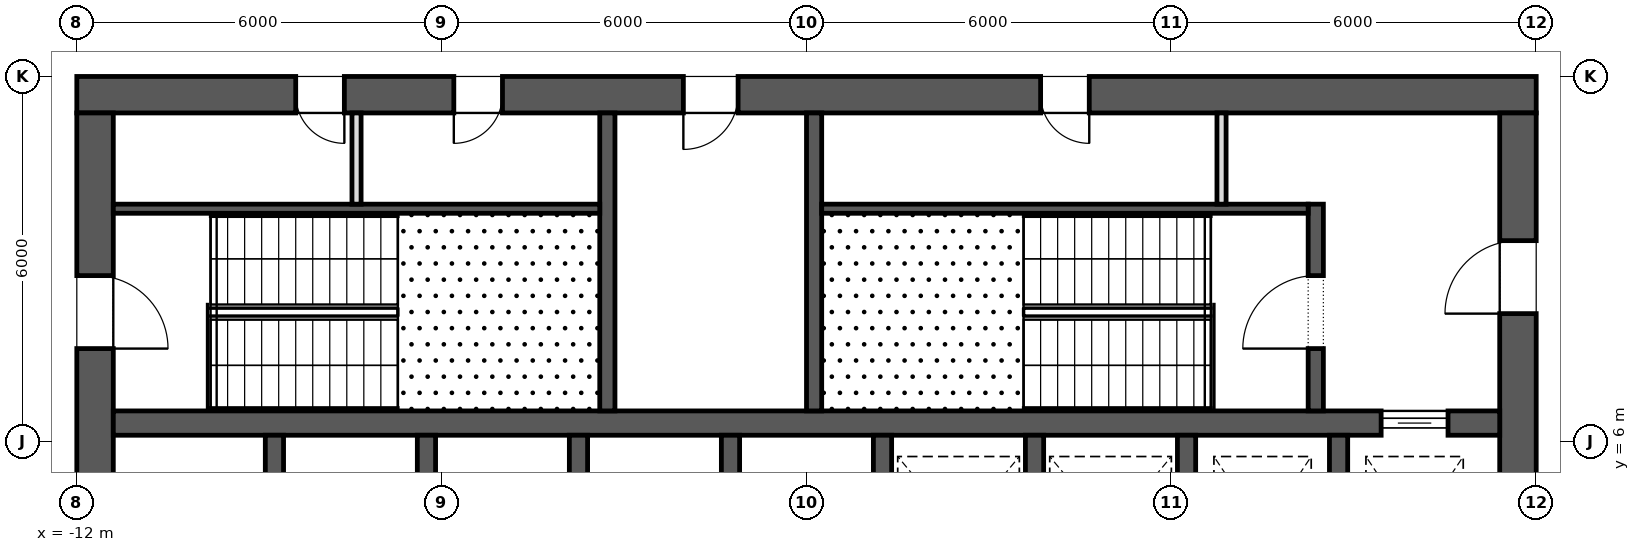
"""IFC4 building model, lengths in metres.
Left out: names, types, materials, properties, quantities, classifications, styles, units other than length and angle.
Written with IfcOpenShell. Run it as: python <this file> out.ifc"""

import sys

from ifc_helpers import new_model, si_unit, direction, frame, frame_2d, origin, place, context, subcontext, project, spatial, rectangle, extrude, element, fill, save


model = new_model("IFC4")
c1 = context("Model", 3, precision=1e-05, world=origin(), true_north=direction((0.0, 1.0)))
c2 = subcontext(c1, "Body", "Model", "MODEL_VIEW")
j1 = project(units=[si_unit("LENGTHUNIT", "METRE"), si_unit("PLANEANGLEUNIT", "RADIAN")], contexts=[c1])
p1 = place(None, origin())
s1 = spatial("IfcSite", under=j1, at=p1, CompositionType="ELEMENT")
p2 = place(p1, origin())
s2 = spatial("IfcBuilding", under=s1, at=p2, CompositionType="ELEMENT")
p3 = place(p2, frame((0.0, 0.0, 57.1)))
s3 = spatial("IfcBuildingStorey", under=s2, at=p3, CompositionType="ELEMENT", Elevation=57.1)
p4 = place(p3, frame((-12.0, 11.7, 0.0), z_axis=(0.0, 0.0, 1.0), x_axis=(1.0, 0.0, 0.0)))
e1 = element("IfcWall", 1, at=p4, inside=s3, PredefinedType="SHEAR", context=c2, shape_type="SweptSolid", body=[
    extrude(rectangle(XDim=24.0, YDim=0.6, at=frame_2d((12.0, 0.0))), origin(), (0.0, 0.0, 1.0), 4.2),
])
p5 = place(p4, frame((9.975, 0.0, 0.0)))
e2 = element("IfcOpeningElement", 2, at=p5, cuts=e1, PredefinedType="OPENING", context=c2, shape_type="SweptSolid", body=[
    extrude(rectangle(XDim=0.9, YDim=2.1, at=frame_2d((0.45, 1.05))), frame((0.0, 0.312, 0.0), z_axis=(0.0, -1.0, 0.0), x_axis=(1.0, 0.0, 0.0)), (0.0, 0.0, 1.0), 0.624),
])
p6 = place(p4, frame((3.6, 0.0, 0.0)))
e3 = element("IfcOpeningElement", 3, at=p6, cuts=e1, PredefinedType="OPENING", context=c2, shape_type="SweptSolid", body=[
    extrude(rectangle(XDim=0.8, YDim=2.1, at=frame_2d((0.4, 1.05))), frame((0.0, 0.312, 0.0), z_axis=(0.0, -1.0, 0.0), x_axis=(1.0, 0.0, 0.0)), (0.0, 0.0, 1.0), 0.624),
])
p7 = place(p4, frame((6.2, 0.0, 0.0)))
e4 = element("IfcOpeningElement", 4, at=p7, cuts=e1, PredefinedType="OPENING", context=c2, shape_type="SweptSolid", body=[
    extrude(rectangle(XDim=0.8, YDim=2.1, at=frame_2d((0.4, 1.05))), frame((0.0, 0.312, 0.0), z_axis=(0.0, -1.0, 0.0), x_axis=(1.0, 0.0, 0.0)), (0.0, 0.0, 1.0), 0.624),
])
p8 = place(p4, frame((15.85, 0.0, 0.0)))
e5 = element("IfcOpeningElement", 5, at=p8, cuts=e1, PredefinedType="OPENING", context=c2, shape_type="SweptSolid", body=[
    extrude(rectangle(XDim=0.8, YDim=2.1, at=frame_2d((0.4, 1.05))), frame((0.0, 0.312, 0.0), z_axis=(0.0, -1.0, 0.0), x_axis=(1.0, 0.0, 0.0)), (0.0, 0.0, 1.0), 0.624),
])
p9 = place(p3, frame((11.7, -11.4, 0.0), z_axis=(0.0, 0.0, 1.0), x_axis=(0.0, 1.0, 0.0)))
e6 = element("IfcWall", 6, at=p9, inside=s3, PredefinedType="SHEAR", context=c2, shape_type="SweptSolid", body=[
    extrude(rectangle(XDim=22.8, YDim=0.6, at=frame_2d((11.4, 0.0))), origin(), (0.0, 0.0, 1.0), 4.2),
])
p10 = place(p9, frame((10.2, 0.0, 0.0)))
e7 = element("IfcOpeningElement", 7, at=p10, cuts=e6, PredefinedType="OPENING", context=c2, shape_type="SweptSolid", body=[
    extrude(rectangle(XDim=2.4, YDim=2.1, at=frame_2d((1.2, 1.05))), frame((0.0, 0.312, 0.0), z_axis=(0.0, -1.0, 0.0), x_axis=(1.0, 0.0, 0.0)), (0.0, 0.0, 1.0), 0.624),
])
p11 = place(p9, frame((19.5, 0.0, 0.0)))
e8 = element("IfcOpeningElement", 8, at=p11, cuts=e6, PredefinedType="OPENING", context=c2, shape_type="SweptSolid", body=[
    extrude(rectangle(XDim=1.2, YDim=2.1, at=frame_2d((0.6, 1.05))), frame((0.0, 0.312, 0.0), z_axis=(0.0, -1.0, 0.0), x_axis=(1.0, 0.0, 0.0)), (0.0, 0.0, 1.0), 0.624),
])
p12 = place(p9, frame((2.1, 0.0, 0.0)))
e9 = element("IfcOpeningElement", 9, at=p12, cuts=e6, PredefinedType="OPENING", context=c2, shape_type="SweptSolid", body=[
    extrude(rectangle(XDim=1.2, YDim=2.1, at=frame_2d((0.6, 1.05))), frame((0.0, 0.312, 0.0), z_axis=(0.0, -1.0, 0.0), x_axis=(1.0, 0.0, 0.0)), (0.0, 0.0, 1.0), 0.624),
])
p13 = place(p3, frame((-11.7, -11.4, 0.0), z_axis=(0.0, 0.0, 1.0), x_axis=(0.0, 1.0, 0.0)))
e10 = element("IfcWall", 10, at=p13, inside=s3, PredefinedType="SHEAR", context=c2, shape_type="SweptSolid", body=[
    extrude(rectangle(XDim=22.8, YDim=0.6, at=frame_2d((11.4, 0.0))), origin(), (0.0, 0.0, 1.0), 4.2),
])
p14 = place(p13, frame((10.2, 0.0, 0.0)))
e11 = element("IfcOpeningElement", 11, at=p14, cuts=e10, PredefinedType="OPENING", context=c2, shape_type="SweptSolid", body=[
    extrude(rectangle(XDim=2.4, YDim=2.1, at=frame_2d((1.2, 1.05))), frame((0.0, 0.312, 0.0), z_axis=(0.0, -1.0, 0.0), x_axis=(1.0, 0.0, 0.0)), (0.0, 0.0, 1.0), 0.624),
])
p15 = place(p13, frame((18.925, 0.0, 0.0)))
e12 = element("IfcOpeningElement", 12, at=p15, cuts=e10, PredefinedType="OPENING", context=c2, shape_type="SweptSolid", body=[
    extrude(rectangle(XDim=1.2, YDim=2.1, at=frame_2d((0.6, 1.05))), frame((0.0, 0.312, 0.0), z_axis=(0.0, -1.0, 0.0), x_axis=(1.0, 0.0, 0.0)), (0.0, 0.0, 1.0), 0.624),
])
p16 = place(p13, frame((2.675, 0.0, 0.0)))
e13 = element("IfcOpeningElement", 13, at=p16, cuts=e10, PredefinedType="OPENING", context=c2, shape_type="SweptSolid", body=[
    extrude(rectangle(XDim=1.2, YDim=2.1, at=frame_2d((0.6, 1.05))), frame((0.0, 0.312, 0.0), z_axis=(0.0, -1.0, 0.0), x_axis=(1.0, 0.0, 0.0)), (0.0, 0.0, 1.0), 0.624),
])
p17 = place(p3, frame((-11.4, 6.3, 0.0), z_axis=(0.0, 0.0, 1.0), x_axis=(1.0, 0.0, 0.0)))
e14 = element("IfcWall", 14, at=p17, inside=s3, PredefinedType="SHEAR", context=c2, shape_type="SweptSolid", body=[
    extrude(rectangle(XDim=22.8, YDim=0.4, at=frame_2d((11.4, 0.0))), origin(), (0.0, 0.0, 1.0), 4.2),
])
p18 = place(p17, frame((20.85, 0.0, 0.0)))
e15 = element("IfcOpeningElement", 15, at=p18, cuts=e14, PredefinedType="OPENING", context=c2, shape_type="SweptSolid", body=[
    extrude(rectangle(XDim=1.1, YDim=2.1, at=frame_2d((0.55, 1.05))), frame((0.0, 0.212, 0.0), z_axis=(0.0, -1.0, 0.0), x_axis=(1.0, 0.0, 0.0)), (0.0, 0.0, 1.0), 0.424),
])
for number, where, z_axis, x_axis in (
    (16, (-8.75, 3.2, 0.0), (0.0, 0.0, 1.0), (0.0, 1.0, 0.0)),
    (17, (-6.25, 3.2, 0.0), (0.0, 0.0, 1.0), (0.0, 1.0, 0.0)),
    (18, (-3.75, 3.2, 0.0), (0.0, 0.0, 1.0), (0.0, 1.0, 0.0)),
    (19, (-1.25, 3.2, 0.0), (0.0, 0.0, 1.0), (0.0, 1.0, 0.0)),
    (20, (1.25, 3.2, 0.0), (0.0, 0.0, 1.0), (0.0, 1.0, 0.0)),
    (21, (3.75, 3.2, 0.0), (0.0, 0.0, 1.0), (0.0, 1.0, 0.0)),
    (22, (6.25, 3.2, 0.0), (0.0, 0.0, 1.0), (0.0, 1.0, 0.0)),
    (23, (8.75, 3.2, 0.0), (0.0, 0.0, 1.0), (0.0, 1.0, 0.0)),
):
    element("IfcWall", number, at=place(p3, frame(where, z_axis=z_axis, x_axis=x_axis)), inside=s3, PredefinedType="SHEAR", context=c2, shape_type="SweptSolid", body=[
        extrude(rectangle(XDim=2.9, YDim=0.3, at=frame_2d((1.45, 0.0))), origin(), (0.0, 0.0, 1.0), 4.2),
    ])
for number, where, z_axis, x_axis in (
    (24, (-3.275, 6.5, 0.0), (0.0, 0.0, 1.0), (0.0, 1.0, 0.0)),
    (25, (0.125, 6.5, 0.0), (0.0, 0.0, 1.0), (0.0, 1.0, 0.0)),
):
    element("IfcWall", number, at=place(p3, frame(where, z_axis=z_axis, x_axis=x_axis)), inside=s3, PredefinedType="SHEAR", context=c2, shape_type="SweptSolid", body=[
        extrude(rectangle(XDim=4.9, YDim=0.25, at=frame_2d((2.45, 0.0))), origin(), (0.0, 0.0, 1.0), 3.9),
    ])
p19 = place(p3, frame((8.375, 6.5, 0.0), z_axis=(0.0, 0.0, 1.0), x_axis=(0.0, 1.0, 0.0)))
e26 = element("IfcWall", 26, at=p19, inside=s3, PredefinedType="SHEAR", context=c2, shape_type="SweptSolid", body=[
    extrude(rectangle(XDim=3.4, YDim=0.25, at=frame_2d((1.7, 0.0))), origin(), (0.0, 0.0, 1.0), 3.9),
])
p20 = place(p19, frame((1.025, 0.0, 0.0)))
e27 = element("IfcOpeningElement", 27, at=p20, cuts=e26, PredefinedType="OPENING", context=c2, shape_type="SweptSolid", body=[
    extrude(rectangle(XDim=1.2, YDim=2.1, at=frame_2d((0.6, 1.05))), frame((0.0, 0.137, 0.0), z_axis=(0.0, -1.0, 0.0), x_axis=(1.0, 0.0, 0.0)), (0.0, 0.0, 1.0), 0.274),
])
for number, where, z_axis, x_axis in (
    (28, (-11.4, 9.825, 0.0), (0.0, 0.0, 1.0), (1.0, 0.0, 0.0)),
    (29, (0.25, 9.825, 0.0), (0.0, 0.0, 1.0), (1.0, 0.0, 0.0)),
):
    element("IfcWall", number, at=place(p3, frame(where, z_axis=z_axis, x_axis=x_axis)), inside=s3, PredefinedType="SHEAR", context=c2, shape_type="SweptSolid", body=[
        extrude(rectangle(XDim=8.0, YDim=0.15, at=frame_2d((4.0, 0.0))), origin(), (0.0, 0.0, 1.0), 3.9),
    ])
for number, where, z_axis, x_axis in (
    (30, (-7.4, 9.9, 0.0), (0.0, 0.0, 1.0), (0.0, 1.0, 0.0)),
    (31, (6.825, 9.9, 0.0), (0.0, 0.0, 1.0), (0.0, 1.0, 0.0)),
):
    element("IfcWall", number, at=place(p3, frame(where, z_axis=z_axis, x_axis=x_axis)), inside=s3, PredefinedType="PARTITIONING", context=c2, shape_type="SweptSolid", body=[
        extrude(rectangle(XDim=1.5, YDim=0.15, at=frame_2d((0.75, 0.0))), origin(), (0.0, 0.0, 1.0), 3.9),
    ])
p21 = place(p18, origin())
e32 = element("IfcDoor", 32, at=p21, inside=s3, OperationType="SLIDING_TO_LEFT", PredefinedType="DOOR", context=c2, shape_type="SweptSolid", body=[
    extrude(rectangle(XDim=1.1, YDim=2.1, at=frame_2d((0.55, 1.05))), frame((0.0, 0.025, 0.0), z_axis=(0.0, -1.0, 0.0), x_axis=(1.0, 0.0, 0.0)), (0.0, 0.0, 1.0), 0.05),
])
fill(e15, e32)
p22 = place(p15, frame((1.2, 0.0, 0.0), z_axis=(0.0, 0.0, 1.0), x_axis=(-1.0, 0.0, 0.0)))
e33 = element("IfcDoor", 33, at=p22, inside=s3, OperationType="SINGLE_SWING_LEFT", PredefinedType="DOOR", context=c2, shape_type="SweptSolid", body=[
    extrude(rectangle(XDim=1.2, YDim=2.1, at=frame_2d((0.6, 1.05))), frame((0.0, 0.025, 0.0), z_axis=(0.0, -1.0, 0.0), x_axis=(1.0, 0.0, 0.0)), (0.0, 0.0, 1.0), 0.05),
])
fill(e12, e33)
p23 = place(p20, origin())
e34 = element("IfcDoor", 34, at=p23, inside=s3, OperationType="SINGLE_SWING_RIGHT", PredefinedType="DOOR", context=c2, shape_type="SweptSolid", body=[
    extrude(rectangle(XDim=1.2, YDim=2.1, at=frame_2d((0.6, 1.05))), frame((0.0, 0.025, 0.0), z_axis=(0.0, -1.0, 0.0), x_axis=(1.0, 0.0, 0.0)), (0.0, 0.0, 1.0), 0.05),
])
fill(e27, e34)
p24 = place(p11, origin())
e35 = element("IfcDoor", 35, at=p24, inside=s3, OperationType="SINGLE_SWING_RIGHT", PredefinedType="DOOR", context=c2, shape_type="SweptSolid", body=[
    extrude(rectangle(XDim=1.2, YDim=2.1, at=frame_2d((0.6, 1.05))), frame((0.0, 0.025, 0.0), z_axis=(0.0, -1.0, 0.0), x_axis=(1.0, 0.0, 0.0)), (0.0, 0.0, 1.0), 0.05),
])
fill(e8, e35)
p25 = place(p5, frame((0.9, 0.0, 0.0), z_axis=(0.0, 0.0, 1.0), x_axis=(-1.0, 0.0, 0.0)))
e36 = element("IfcDoor", 36, at=p25, inside=s3, OperationType="SINGLE_SWING_LEFT", PredefinedType="DOOR", context=c2, shape_type="SweptSolid", body=[
    extrude(rectangle(XDim=0.9, YDim=2.1, at=frame_2d((0.45, 1.05))), frame((0.0, 0.025, 0.0), z_axis=(0.0, -1.0, 0.0), x_axis=(1.0, 0.0, 0.0)), (0.0, 0.0, 1.0), 0.05),
])
fill(e2, e36)
p26 = place(p6, frame((0.8, 0.0, 0.0), z_axis=(0.0, 0.0, 1.0), x_axis=(-1.0, 0.0, 0.0)))
e37 = element("IfcDoor", 37, at=p26, inside=s3, OperationType="SINGLE_SWING_RIGHT", PredefinedType="DOOR", context=c2, shape_type="SweptSolid", body=[
    extrude(rectangle(XDim=0.8, YDim=2.1, at=frame_2d((0.4, 1.05))), frame((0.0, 0.025, 0.0), z_axis=(0.0, -1.0, 0.0), x_axis=(1.0, 0.0, 0.0)), (0.0, 0.0, 1.0), 0.05),
])
fill(e3, e37)
p27 = place(p7, frame((0.8, 0.0, 0.0), z_axis=(0.0, 0.0, 1.0), x_axis=(-1.0, 0.0, 0.0)))
e38 = element("IfcDoor", 38, at=p27, inside=s3, OperationType="SINGLE_SWING_LEFT", PredefinedType="DOOR", context=c2, shape_type="SweptSolid", body=[
    extrude(rectangle(XDim=0.8, YDim=2.1, at=frame_2d((0.4, 1.05))), frame((0.0, 0.025, 0.0), z_axis=(0.0, -1.0, 0.0), x_axis=(1.0, 0.0, 0.0)), (0.0, 0.0, 1.0), 0.05),
])
fill(e4, e38)
p28 = place(p8, frame((0.8, 0.0, 0.0), z_axis=(0.0, 0.0, 1.0), x_axis=(-1.0, 0.0, 0.0)))
e39 = element("IfcDoor", 39, at=p28, inside=s3, OperationType="SINGLE_SWING_RIGHT", PredefinedType="DOOR", context=c2, shape_type="SweptSolid", body=[
    extrude(rectangle(XDim=0.8, YDim=2.1, at=frame_2d((0.4, 1.05))), frame((0.0, 0.025, 0.0), z_axis=(0.0, -1.0, 0.0), x_axis=(1.0, 0.0, 0.0)), (0.0, 0.0, 1.0), 0.05),
])
fill(e5, e39)
save(model, sys.argv[1])
